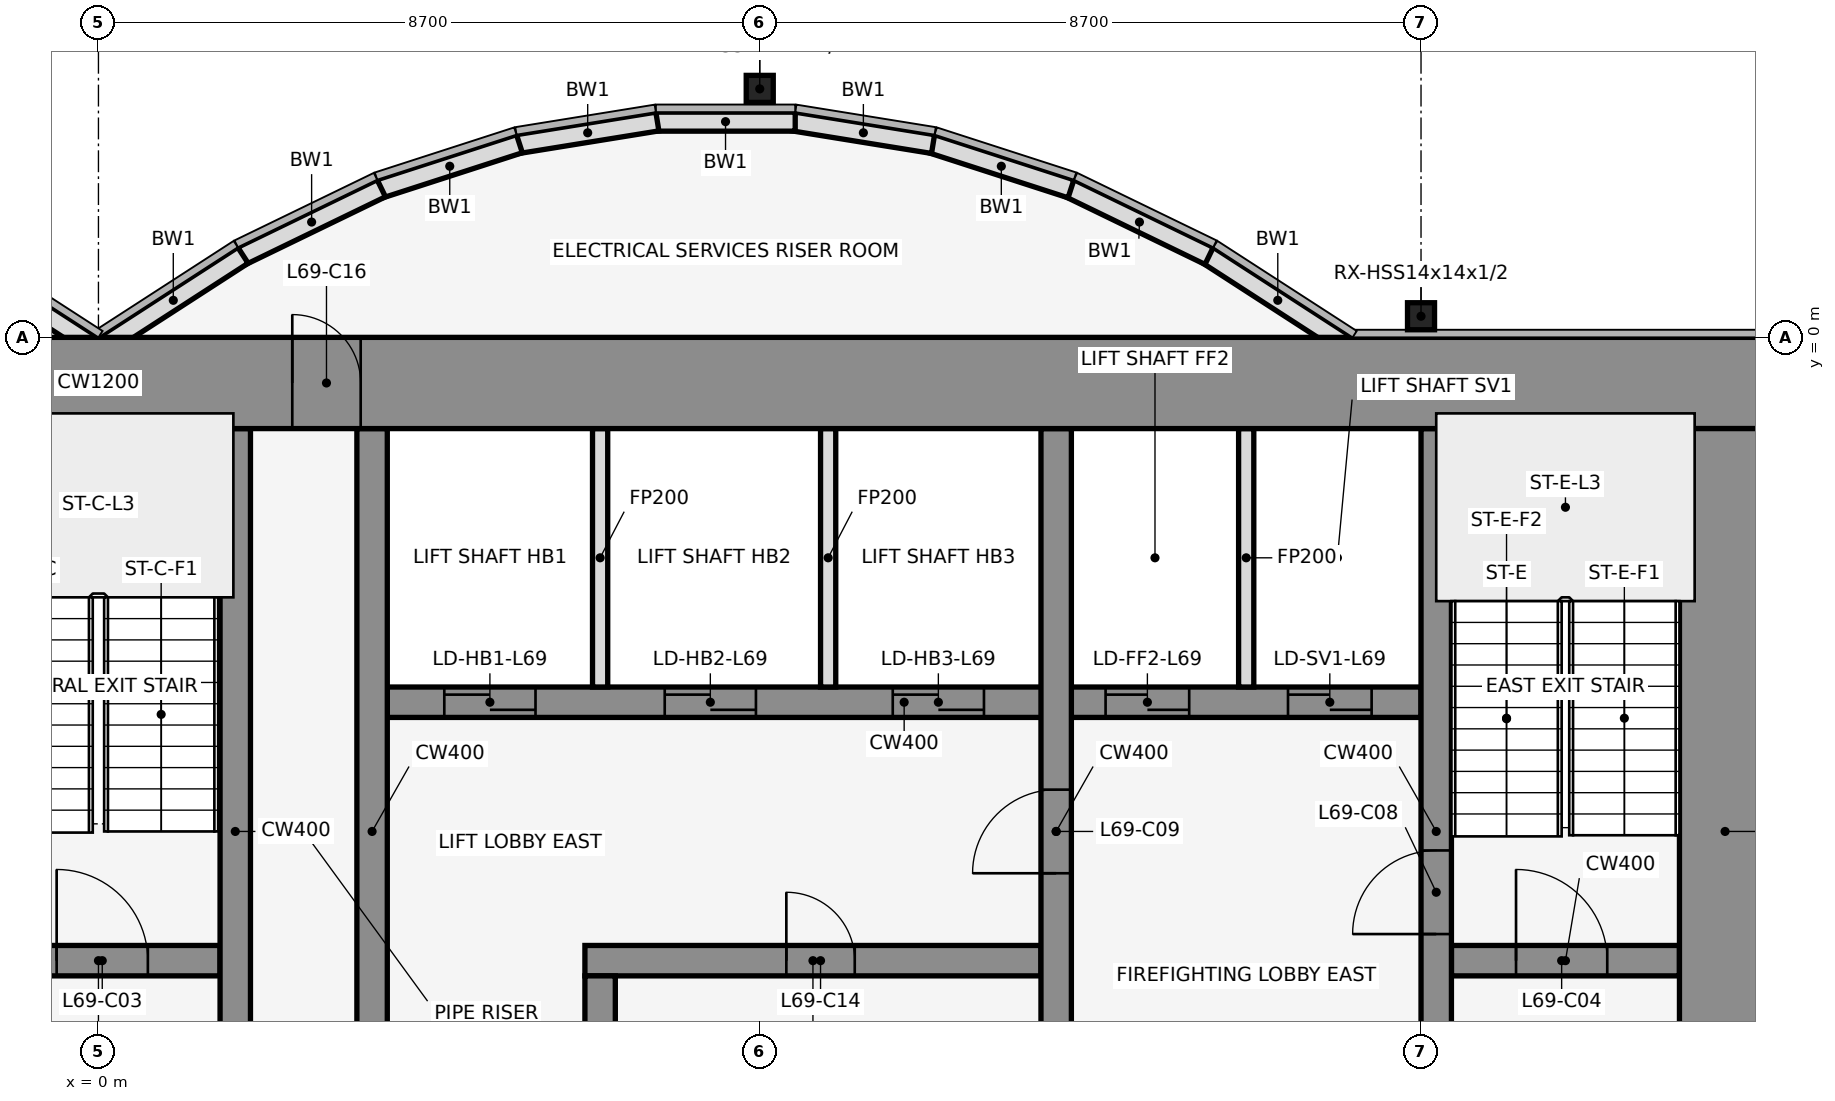
"""IFC4 building model, lengths in metres.
Left out: names, types, materials, properties, quantities, classifications, styles, units other than length and angle.
Written with IfcOpenShell. Run it as: python <this file> out.ifc"""

import sys

from ifc_helpers import new_model, si_unit, direction, frame, frame_2d, origin, origin_2d, place, context, subcontext, project, spatial, rectangle, hollow_rectangle, extrude, element, fill, save


model = new_model("IFC4")
c1 = context("Model", 3, precision=1e-05, world=origin(), true_north=direction((0.0, 1.0)))
c2 = subcontext(c1, "Body", "Model", "MODEL_VIEW")
j1 = project(units=[si_unit("LENGTHUNIT", "METRE"), si_unit("PLANEANGLEUNIT", "RADIAN")], contexts=[c1])
p1 = place(None, origin())
s1 = spatial("IfcSite", under=j1, at=p1, CompositionType="ELEMENT")
p2 = place(p1, origin())
s2 = spatial("IfcBuilding", under=s1, at=p2, CompositionType="ELEMENT")
p3 = place(p2, frame((0.0, 0.0, 306.5)))
s3 = spatial("IfcBuildingStorey", under=s2, at=p3, CompositionType="ELEMENT", Elevation=306.5)
for number, where, z_axis, x_axis in (
    (1, (8.7, 3.269, 0.0), (0.0, 0.0, 1.0), (1.0, 0.0, 0.0)),
    (2, (17.4, 0.278, 0.0), (0.0, 0.0, 1.0), (1.0, 0.0, 0.0)),
):
    element("IfcColumn", number, at=place(p3, frame(where, z_axis=z_axis, x_axis=x_axis)), inside=s3, PredefinedType="COLUMN", context=c2, shape_type="SweptSolid", body=[
        extrude(hollow_rectangle(XDim=0.356, YDim=0.356, WallThickness=0.012, at=origin_2d()), origin(), (0.0, 0.0, 1.0), 4.5),
    ])
p4 = place(p3, frame((16.432, -0.105, 0.0), z_axis=(0.0, 0.0, 1.0), x_axis=(-0.83981312244, 0.542875602121, 0.0)))
e3 = element("IfcWall", 3, at=p4, inside=s3, PredefinedType="STANDARD", context=c2, shape_type="SweptSolid", body=[
    extrude(rectangle(XDim=2.183, YDim=0.25, at=frame_2d((1.091, 0.0))), origin(), (0.0, 0.0, 1.0), 4.35),
])
p5 = place(p3, frame((14.612, 1.073, 0.0), z_axis=(0.0, 0.0, 1.0), x_axis=(-0.89982408427, 0.436252928206, 0.0)))
e4 = element("IfcWall", 4, at=p5, inside=s3, PredefinedType="STANDARD", context=c2, shape_type="SweptSolid", body=[
    extrude(rectangle(XDim=2.038, YDim=0.25, at=frame_2d((1.019, 0.0))), origin(), (0.0, 0.0, 1.0), 4.35),
])
p6 = place(p3, frame((12.795, 1.955, 0.0), z_axis=(0.0, 0.0, 1.0), x_axis=(-0.951495806175, 0.307661714928, 0.0)))
e5 = element("IfcWall", 5, at=p6, inside=s3, PredefinedType="STANDARD", context=c2, shape_type="SweptSolid", body=[
    extrude(rectangle(XDim=1.927, YDim=0.25, at=frame_2d((0.963, 0.0))), origin(), (0.0, 0.0, 1.0), 4.35),
])
p7 = place(p3, frame((10.98, 2.543, 0.0), z_axis=(0.0, 0.0, 1.0), x_axis=(-0.987181718931, 0.159600293885, 0.0)))
e6 = element("IfcWall", 6, at=p7, inside=s3, PredefinedType="STANDARD", context=c2, shape_type="SweptSolid", body=[
    extrude(rectangle(XDim=1.857, YDim=0.25, at=frame_2d((0.929, 0.0))), origin(), (0.0, 0.0, 1.0), 4.35),
])
p8 = place(p3, frame((9.167, 2.838, 0.0), z_axis=(0.0, 0.0, 1.0), x_axis=(-1.0, 0.0, 0.0)))
e7 = element("IfcWall", 7, at=p8, inside=s3, PredefinedType="STANDARD", context=c2, shape_type="SweptSolid", body=[
    extrude(rectangle(XDim=1.833, YDim=0.25, at=frame_2d((0.917, 0.0))), origin(), (0.0, 0.0, 1.0), 4.35),
])
p9 = place(p3, frame((7.353, 2.84, 0.0), z_axis=(0.0, 0.0, 1.0), x_axis=(-0.987181718931, -0.159600293885, 0.0)))
e8 = element("IfcWall", 8, at=p9, inside=s3, PredefinedType="STANDARD", context=c2, shape_type="SweptSolid", body=[
    extrude(rectangle(XDim=1.857, YDim=0.25, at=frame_2d((0.929, 0.0))), origin(), (0.0, 0.0, 1.0), 4.35),
])
p10 = place(p3, frame((5.538, 2.548, 0.0), z_axis=(0.0, 0.0, 1.0), x_axis=(-0.951495806175, -0.307661714928, 0.0)))
e9 = element("IfcWall", 9, at=p10, inside=s3, PredefinedType="STANDARD", context=c2, shape_type="SweptSolid", body=[
    extrude(rectangle(XDim=1.927, YDim=0.25, at=frame_2d((0.963, 0.0))), origin(), (0.0, 0.0, 1.0), 4.35),
])
p11 = place(p3, frame((3.721, 1.962, 0.0), z_axis=(0.0, 0.0, 1.0), x_axis=(-0.89982408427, -0.436252928206, 0.0)))
e10 = element("IfcWall", 10, at=p11, inside=s3, PredefinedType="STANDARD", context=c2, shape_type="SweptSolid", body=[
    extrude(rectangle(XDim=2.038, YDim=0.25, at=frame_2d((1.019, 0.0))), origin(), (0.0, 0.0, 1.0), 4.35),
])
for number, where, z_axis, x_axis in (
    (11, (1.901, 1.08, 0.0), (0.0, 0.0, 1.0), (-0.84, -0.543, 0.0)),
    (12, (-0.068, -0.105, 0.0), (0.0, 0.0, 1.0), (-0.84, 0.543, 0.0)),
):
    element("IfcWall", number, at=place(p3, frame(where, z_axis=z_axis, x_axis=x_axis)), inside=s3, PredefinedType="STANDARD", context=c2, shape_type="SweptSolid", body=[
        extrude(rectangle(XDim=2.183, YDim=0.25, at=frame_2d((1.091, 0.0))), origin(), (0.0, 0.0, 1.0), 4.35),
    ])
p12 = place(p3, frame((-1.6, -8.2, 0.0), z_axis=(0.0, 0.0, 1.0), x_axis=(1.0, 0.0, 0.0)))
e13 = element("IfcWall", 13, at=p12, inside=s3, PredefinedType="SHEAR", context=c2, shape_type="SweptSolid", body=[
    extrude(rectangle(XDim=3.2, YDim=0.4, at=frame_2d((1.6, 0.0))), origin(), (0.0, 0.0, 1.0), 4.5),
])
p13 = place(p12, frame((1.05, 0.0, 0.0)))
e14 = element("IfcOpeningElement", 14, at=p13, cuts=e13, PredefinedType="OPENING", context=c2, shape_type="SweptSolid", body=[
    extrude(rectangle(XDim=1.2, YDim=2.1, at=frame_2d((0.6, 1.05))), frame((0.0, 0.212, 0.0), z_axis=(0.0, -1.0, 0.0), x_axis=(1.0, 0.0, 0.0)), (0.0, 0.0, 1.0), 0.424),
])
p14 = place(p3, frame((6.4, -8.2, 0.0), z_axis=(0.0, 0.0, 1.0), x_axis=(1.0, 0.0, 0.0)))
e15 = element("IfcWall", 15, at=p14, inside=s3, PredefinedType="SHEAR", context=c2, shape_type="SweptSolid", body=[
    extrude(rectangle(XDim=6.0, YDim=0.4, at=frame_2d((3.0, 0.0))), origin(), (0.0, 0.0, 1.0), 4.5),
])
p15 = place(p14, frame((2.65, 0.0, 0.0)))
e16 = element("IfcOpeningElement", 16, at=p15, cuts=e15, PredefinedType="OPENING", context=c2, shape_type="SweptSolid", body=[
    extrude(rectangle(XDim=0.9, YDim=2.1, at=frame_2d((0.45, 1.05))), frame((0.0, 0.212, 0.0), z_axis=(0.0, -1.0, 0.0), x_axis=(1.0, 0.0, 0.0)), (0.0, 0.0, 1.0), 0.424),
])
p16 = place(p3, frame((17.8, -8.2, 0.0), z_axis=(0.0, 0.0, 1.0), x_axis=(1.0, 0.0, 0.0)))
e17 = element("IfcWall", 17, at=p16, inside=s3, PredefinedType="SHEAR", context=c2, shape_type="SweptSolid", body=[
    extrude(rectangle(XDim=3.0, YDim=0.4, at=frame_2d((1.5, 0.0))), origin(), (0.0, 0.0, 1.0), 4.5),
])
p17 = place(p16, frame((0.85, 0.0, 0.0)))
e18 = element("IfcOpeningElement", 18, at=p17, cuts=e17, PredefinedType="OPENING", context=c2, shape_type="SweptSolid", body=[
    extrude(rectangle(XDim=1.2, YDim=2.1, at=frame_2d((0.6, 1.05))), frame((0.0, 0.212, 0.0), z_axis=(0.0, -1.0, 0.0), x_axis=(1.0, 0.0, 0.0)), (0.0, 0.0, 1.0), 0.424),
])
p18 = place(p3, frame((3.8, -4.8, 0.0), z_axis=(0.0, 0.0, 1.0), x_axis=(1.0, 0.0, 0.0)))
e19 = element("IfcWall", 19, at=p18, inside=s3, PredefinedType="SHEAR", context=c2, shape_type="SweptSolid", body=[
    extrude(rectangle(XDim=13.6, YDim=0.4, at=frame_2d((6.8, 0.0))), origin(), (0.0, 0.0, 1.0), 4.5),
])
p19 = place(p18, frame((0.75, 0.0, 0.0)))
e20 = element("IfcOpeningElement", 20, at=p19, cuts=e19, PredefinedType="OPENING", context=c2, shape_type="SweptSolid", body=[
    extrude(rectangle(XDim=1.2, YDim=2.1, at=frame_2d((0.6, 1.05))), frame((0.0, 0.212, 0.0), z_axis=(0.0, -1.0, 0.0), x_axis=(1.0, 0.0, 0.0)), (0.0, 0.0, 1.0), 0.424),
])
p20 = place(p18, frame((3.65, 0.0, 0.0)))
e21 = element("IfcOpeningElement", 21, at=p20, cuts=e19, PredefinedType="OPENING", context=c2, shape_type="SweptSolid", body=[
    extrude(rectangle(XDim=1.2, YDim=2.1, at=frame_2d((0.6, 1.05))), frame((0.0, 0.212, 0.0), z_axis=(0.0, -1.0, 0.0), x_axis=(1.0, 0.0, 0.0)), (0.0, 0.0, 1.0), 0.424),
])
p21 = place(p18, frame((6.65, 0.0, 0.0)))
e22 = element("IfcOpeningElement", 22, at=p21, cuts=e19, PredefinedType="OPENING", context=c2, shape_type="SweptSolid", body=[
    extrude(rectangle(XDim=1.2, YDim=2.1, at=frame_2d((0.6, 1.05))), frame((0.0, 0.212, 0.0), z_axis=(0.0, -1.0, 0.0), x_axis=(1.0, 0.0, 0.0)), (0.0, 0.0, 1.0), 0.424),
])
p22 = place(p18, frame((9.45, 0.0, 0.0)))
e23 = element("IfcOpeningElement", 23, at=p22, cuts=e19, PredefinedType="OPENING", context=c2, shape_type="SweptSolid", body=[
    extrude(rectangle(XDim=1.1, YDim=2.1, at=frame_2d((0.55, 1.05))), frame((0.0, 0.212, 0.0), z_axis=(0.0, -1.0, 0.0), x_axis=(1.0, 0.0, 0.0)), (0.0, 0.0, 1.0), 0.424),
])
p23 = place(p18, frame((11.85, 0.0, 0.0)))
e24 = element("IfcOpeningElement", 24, at=p23, cuts=e19, PredefinedType="OPENING", context=c2, shape_type="SweptSolid", body=[
    extrude(rectangle(XDim=1.1, YDim=2.1, at=frame_2d((0.55, 1.05))), frame((0.0, 0.212, 0.0), z_axis=(0.0, -1.0, 0.0), x_axis=(1.0, 0.0, 0.0)), (0.0, 0.0, 1.0), 0.424),
])
p24 = place(p3, frame((1.8, -11.8, 0.0), z_axis=(0.0, 0.0, 1.0), x_axis=(0.0, 1.0, 0.0)))
e25 = element("IfcWall", 25, at=p24, inside=s3, PredefinedType="SHEAR", context=c2, shape_type="SweptSolid", body=[
    extrude(rectangle(XDim=10.6, YDim=0.4, at=frame_2d((5.3, 0.0))), origin(), (0.0, 0.0, 1.0), 4.5),
])
p25 = place(p3, frame((3.6, -11.8, 0.0), z_axis=(0.0, 0.0, 1.0), x_axis=(0.0, 1.0, 0.0)))
e26 = element("IfcWall", 26, at=p25, inside=s3, PredefinedType="SHEAR", context=c2, shape_type="SweptSolid", body=[
    extrude(rectangle(XDim=10.6, YDim=0.4, at=frame_2d((5.3, 0.0))), origin(), (0.0, 0.0, 1.0), 4.5),
])
p26 = place(p25, frame((1.35, 0.0, 0.0)))
e27 = element("IfcOpeningElement", 27, at=p26, cuts=e26, PredefinedType="OPENING", context=c2, shape_type="SweptSolid", body=[
    extrude(rectangle(XDim=0.9, YDim=2.1, at=frame_2d((0.45, 1.05))), frame((0.0, 0.212, 0.0), z_axis=(0.0, -1.0, 0.0), x_axis=(1.0, 0.0, 0.0)), (0.0, 0.0, 1.0), 0.424),
])
p27 = place(p3, frame((6.6, -11.8, 0.0), z_axis=(0.0, 0.0, 1.0), x_axis=(0.0, 1.0, 0.0)))
e28 = element("IfcWall", 28, at=p27, inside=s3, PredefinedType="SHEAR", context=c2, shape_type="SweptSolid", body=[
    extrude(rectangle(XDim=3.4, YDim=0.4, at=frame_2d((1.7, 0.0))), origin(), (0.0, 0.0, 1.0), 4.5),
])
for number, where, z_axis, x_axis in (
    (29, (6.6, -4.6, 0.0), (0.0, 0.0, 1.0), (0.0, 1.0, 0.0)),
    (30, (9.6, -4.6, 0.0), (0.0, 0.0, 1.0), (0.0, 1.0, 0.0)),
):
    element("IfcWall", number, at=place(p3, frame(where, z_axis=z_axis, x_axis=x_axis)), inside=s3, PredefinedType="PARTITIONING", context=c2, shape_type="SweptSolid", body=[
        extrude(rectangle(XDim=3.4, YDim=0.2, at=frame_2d((1.7, 0.0))), origin(), (0.0, 0.0, 1.0), 3.418),
    ])
p28 = place(p3, frame((12.6, -11.8, 0.0), z_axis=(0.0, 0.0, 1.0), x_axis=(0.0, 1.0, 0.0)))
e31 = element("IfcWall", 31, at=p28, inside=s3, PredefinedType="SHEAR", context=c2, shape_type="SweptSolid", body=[
    extrude(rectangle(XDim=10.6, YDim=0.4, at=frame_2d((5.3, 0.0))), origin(), (0.0, 0.0, 1.0), 4.5),
])
p29 = place(p28, frame((4.75, 0.0, 0.0)))
e32 = element("IfcOpeningElement", 32, at=p29, cuts=e31, PredefinedType="OPENING", context=c2, shape_type="SweptSolid", body=[
    extrude(rectangle(XDim=1.1, YDim=2.1, at=frame_2d((0.55, 1.05))), frame((0.0, 0.212, 0.0), z_axis=(0.0, -1.0, 0.0), x_axis=(1.0, 0.0, 0.0)), (0.0, 0.0, 1.0), 0.424),
])
p30 = place(p3, frame((15.1, -4.6, 0.0), z_axis=(0.0, 0.0, 1.0), x_axis=(0.0, 1.0, 0.0)))
e33 = element("IfcWall", 33, at=p30, inside=s3, PredefinedType="PARTITIONING", context=c2, shape_type="SweptSolid", body=[
    extrude(rectangle(XDim=3.4, YDim=0.2, at=frame_2d((1.7, 0.0))), origin(), (0.0, 0.0, 1.0), 3.418),
])
p31 = place(p3, frame((17.6, -11.8, 0.0), z_axis=(0.0, 0.0, 1.0), x_axis=(0.0, 1.0, 0.0)))
e34 = element("IfcWall", 34, at=p31, inside=s3, PredefinedType="SHEAR", context=c2, shape_type="SweptSolid", body=[
    extrude(rectangle(XDim=10.6, YDim=0.4, at=frame_2d((5.3, 0.0))), origin(), (0.0, 0.0, 1.0), 4.5),
])
p32 = place(p31, frame((1.25, 0.0, 0.0)))
e35 = element("IfcOpeningElement", 35, at=p32, cuts=e34, PredefinedType="OPENING", context=c2, shape_type="SweptSolid", body=[
    extrude(rectangle(XDim=1.1, YDim=2.1, at=frame_2d((0.55, 1.05))), frame((0.0, 0.212, 0.0), z_axis=(0.0, -1.0, 0.0), x_axis=(1.0, 0.0, 0.0)), (0.0, 0.0, 1.0), 0.424),
])
p33 = place(p31, frame((3.95, 0.0, 0.0)))
e36 = element("IfcOpeningElement", 36, at=p33, cuts=e34, PredefinedType="OPENING", context=c2, shape_type="SweptSolid", body=[
    extrude(rectangle(XDim=1.1, YDim=2.1, at=frame_2d((0.55, 1.05))), frame((0.0, 0.212, 0.0), z_axis=(0.0, -1.0, 0.0), x_axis=(1.0, 0.0, 0.0)), (0.0, 0.0, 1.0), 0.424),
])
p34 = place(p3, frame((-22.0, -0.6, 0.0), z_axis=(0.0, 0.0, 1.0), x_axis=(1.0, 0.0, 0.0)))
e37 = element("IfcWall", 37, at=p34, inside=s3, PredefinedType="SHEAR", context=c2, shape_type="SweptSolid", body=[
    extrude(rectangle(XDim=44.0, YDim=1.2, at=frame_2d((22.0, 0.0))), origin(), (0.0, 0.0, 1.0), 4.5),
])
p35 = place(p34, frame((18.55, 0.0, 0.0)))
e38 = element("IfcOpeningElement", 38, at=p35, cuts=e37, PredefinedType="OPENING", context=c2, shape_type="SweptSolid", body=[
    extrude(rectangle(XDim=0.9, YDim=2.1, at=frame_2d((0.45, 1.05))), frame((0.0, 0.612, 0.0), z_axis=(0.0, -1.0, 0.0), x_axis=(1.0, 0.0, 0.0)), (0.0, 0.0, 1.0), 1.224),
])
p36 = place(p34, frame((24.55, 0.0, 0.0)))
e39 = element("IfcOpeningElement", 39, at=p36, cuts=e37, PredefinedType="OPENING", context=c2, shape_type="SweptSolid", body=[
    extrude(rectangle(XDim=0.9, YDim=2.1, at=frame_2d((0.45, 1.05))), frame((0.0, 0.612, 0.0), z_axis=(0.0, -1.0, 0.0), x_axis=(1.0, 0.0, 0.0)), (0.0, 0.0, 1.0), 1.224),
])
p37 = place(p3, frame((21.4, -11.8, 0.0), z_axis=(0.0, 0.0, 1.0), x_axis=(0.0, 1.0, 0.0)))
e40 = element("IfcWall", 40, at=p37, inside=s3, PredefinedType="SHEAR", context=c2, shape_type="SweptSolid", body=[
    extrude(rectangle(XDim=10.6, YDim=1.2, at=frame_2d((5.3, 0.0))), origin(), (0.0, 0.0, 1.0), 4.5),
])
p38 = place(p13, origin())
e41 = element("IfcDoor", 41, at=p38, inside=s3, OperationType="SINGLE_SWING_LEFT", PredefinedType="DOOR", context=c2, shape_type="SweptSolid", body=[
    extrude(rectangle(XDim=1.2, YDim=2.1, at=frame_2d((0.6, 1.05))), frame((0.0, 0.025, 0.0), z_axis=(0.0, -1.0, 0.0), x_axis=(1.0, 0.0, 0.0)), (0.0, 0.0, 1.0), 0.05),
])
fill(e14, e41)
p39 = place(p17, origin())
e42 = element("IfcDoor", 42, at=p39, inside=s3, OperationType="SINGLE_SWING_RIGHT", PredefinedType="DOOR", context=c2, shape_type="SweptSolid", body=[
    extrude(rectangle(XDim=1.2, YDim=2.1, at=frame_2d((0.6, 1.05))), frame((0.0, 0.025, 0.0), z_axis=(0.0, -1.0, 0.0), x_axis=(1.0, 0.0, 0.0)), (0.0, 0.0, 1.0), 0.05),
])
fill(e18, e42)
p40 = place(p19, origin())
e43 = element("IfcDoor", 43, at=p40, inside=s3, OperationType="DOUBLE_DOOR_SLIDING", PredefinedType="DOOR", context=c2, shape_type="SweptSolid", body=[
    extrude(rectangle(XDim=1.2, YDim=2.1, at=frame_2d((0.6, 1.05))), frame((0.0, 0.025, 0.0), z_axis=(0.0, -1.0, 0.0), x_axis=(1.0, 0.0, 0.0)), (0.0, 0.0, 1.0), 0.05),
])
fill(e20, e43)
p41 = place(p20, origin())
e44 = element("IfcDoor", 44, at=p41, inside=s3, OperationType="DOUBLE_DOOR_SLIDING", PredefinedType="DOOR", context=c2, shape_type="SweptSolid", body=[
    extrude(rectangle(XDim=1.2, YDim=2.1, at=frame_2d((0.6, 1.05))), frame((0.0, 0.025, 0.0), z_axis=(0.0, -1.0, 0.0), x_axis=(1.0, 0.0, 0.0)), (0.0, 0.0, 1.0), 0.05),
])
fill(e21, e44)
p42 = place(p21, origin())
e45 = element("IfcDoor", 45, at=p42, inside=s3, OperationType="DOUBLE_DOOR_SLIDING", PredefinedType="DOOR", context=c2, shape_type="SweptSolid", body=[
    extrude(rectangle(XDim=1.2, YDim=2.1, at=frame_2d((0.6, 1.05))), frame((0.0, 0.025, 0.0), z_axis=(0.0, -1.0, 0.0), x_axis=(1.0, 0.0, 0.0)), (0.0, 0.0, 1.0), 0.05),
])
fill(e22, e45)
p43 = place(p22, origin())
e46 = element("IfcDoor", 46, at=p43, inside=s3, OperationType="DOUBLE_DOOR_SLIDING", PredefinedType="DOOR", context=c2, shape_type="SweptSolid", body=[
    extrude(rectangle(XDim=1.1, YDim=2.1, at=frame_2d((0.55, 1.05))), frame((0.0, 0.025, 0.0), z_axis=(0.0, -1.0, 0.0), x_axis=(1.0, 0.0, 0.0)), (0.0, 0.0, 1.0), 0.05),
])
fill(e23, e46)
p44 = place(p23, origin())
e47 = element("IfcDoor", 47, at=p44, inside=s3, OperationType="DOUBLE_DOOR_SLIDING", PredefinedType="DOOR", context=c2, shape_type="SweptSolid", body=[
    extrude(rectangle(XDim=1.1, YDim=2.1, at=frame_2d((0.55, 1.05))), frame((0.0, 0.025, 0.0), z_axis=(0.0, -1.0, 0.0), x_axis=(1.0, 0.0, 0.0)), (0.0, 0.0, 1.0), 0.05),
])
fill(e24, e47)
p45 = place(p33, origin())
e48 = element("IfcDoor", 48, at=p45, inside=s3, OperationType="SINGLE_SWING_RIGHT", PredefinedType="DOOR", context=c2, shape_type="SweptSolid", body=[
    extrude(rectangle(XDim=1.1, YDim=2.1, at=frame_2d((0.55, 1.05))), frame((0.0, 0.025, 0.0), z_axis=(0.0, -1.0, 0.0), x_axis=(1.0, 0.0, 0.0)), (0.0, 0.0, 1.0), 0.05),
])
fill(e36, e48)
p46 = place(p29, frame((1.1, 0.0, 0.0), z_axis=(0.0, 0.0, 1.0), x_axis=(-1.0, 0.0, 0.0)))
e49 = element("IfcDoor", 49, at=p46, inside=s3, OperationType="SINGLE_SWING_RIGHT", PredefinedType="DOOR", context=c2, shape_type="SweptSolid", body=[
    extrude(rectangle(XDim=1.1, YDim=2.1, at=frame_2d((0.55, 1.05))), frame((0.0, 0.025, 0.0), z_axis=(0.0, -1.0, 0.0), x_axis=(1.0, 0.0, 0.0)), (0.0, 0.0, 1.0), 0.05),
])
fill(e32, e49)
p47 = place(p15, frame((0.9, 0.0, 0.0), z_axis=(0.0, 0.0, 1.0), x_axis=(-1.0, 0.0, 0.0)))
e50 = element("IfcDoor", 50, at=p47, inside=s3, OperationType="SINGLE_SWING_LEFT", PredefinedType="DOOR", context=c2, shape_type="SweptSolid", body=[
    extrude(rectangle(XDim=0.9, YDim=2.1, at=frame_2d((0.45, 1.05))), frame((0.0, 0.025, 0.0), z_axis=(0.0, -1.0, 0.0), x_axis=(1.0, 0.0, 0.0)), (0.0, 0.0, 1.0), 0.05),
])
fill(e16, e50)
p48 = place(p36, origin())
e51 = element("IfcDoor", 51, at=p48, inside=s3, OperationType="SINGLE_SWING_LEFT", PredefinedType="DOOR", context=c2, shape_type="SweptSolid", body=[
    extrude(rectangle(XDim=0.9, YDim=2.1, at=frame_2d((0.45, 1.05))), frame((0.0, 0.025, 0.0), z_axis=(0.0, -1.0, 0.0), x_axis=(1.0, 0.0, 0.0)), (0.0, 0.0, 1.0), 0.05),
])
fill(e39, e51)
save(model, sys.argv[1])
